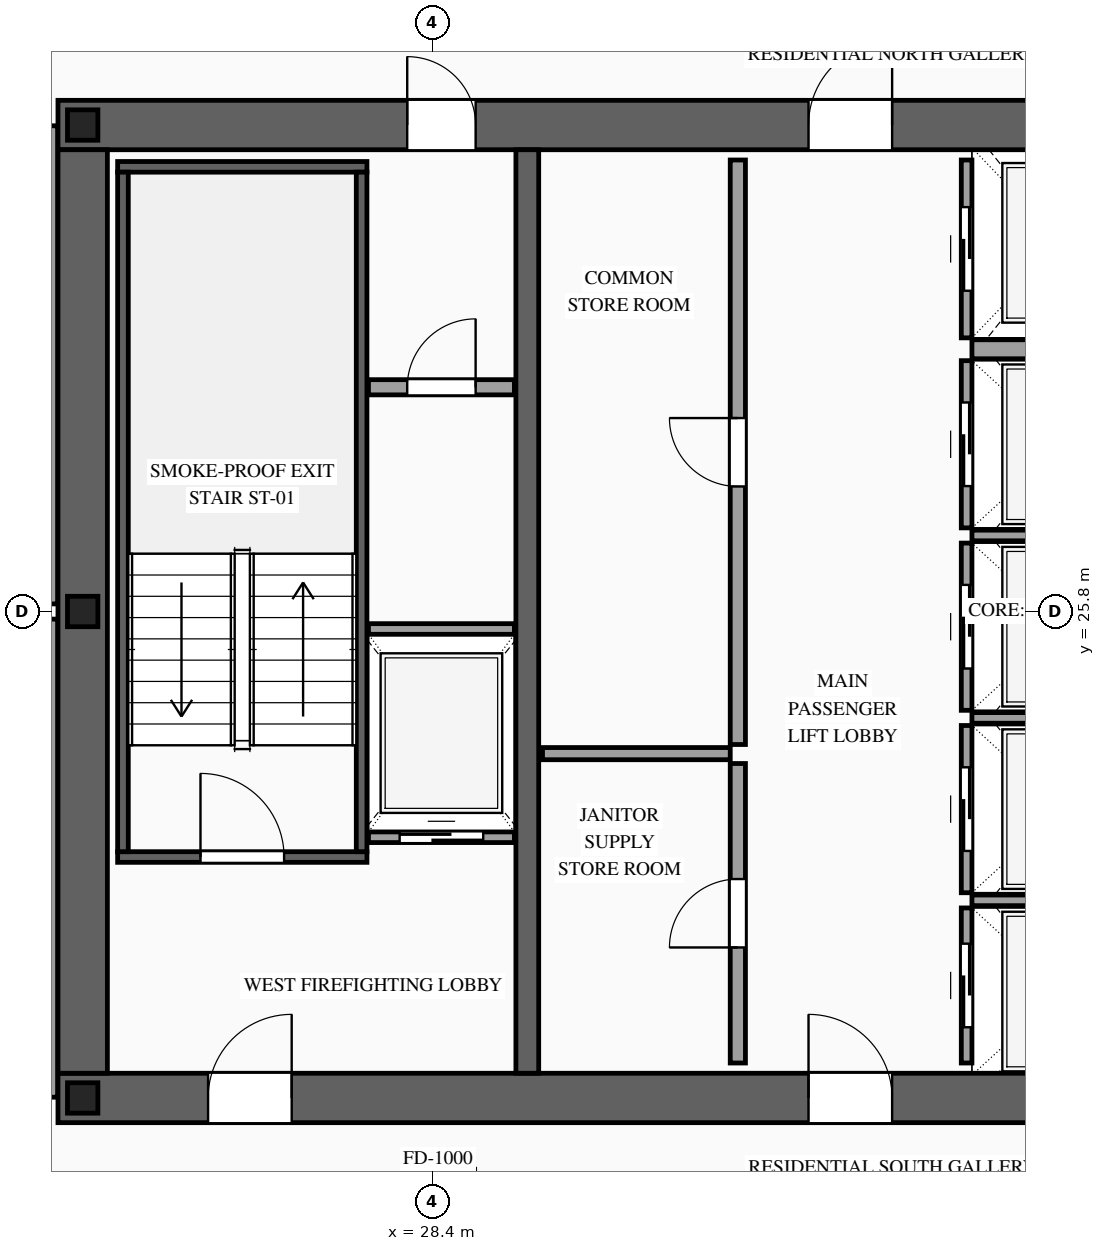
"""IFC4 building model, lengths in metres.
Left out: names, types, materials, properties, quantities, classifications, styles, units other than length and angle.
Written with IfcOpenShell. Run it as: python <this file> out.ifc"""

import sys

from ifc_helpers import new_model, si_unit, direction, frame, frame_2d, origin, origin_2d, place, context, subcontext, project, spatial, rectangle, i_section, extrude, source, transform, mapped, element, fill, save


model = new_model("IFC4")
c1 = context("Model", 3, precision=1e-05, world=origin(), true_north=direction((0.0, 1.0)))
c2 = subcontext(c1, "Body", "Model", "MODEL_VIEW")
j1 = project(units=[si_unit("LENGTHUNIT", "METRE"), si_unit("PLANEANGLEUNIT", "RADIAN")], contexts=[c1])
p1 = place(None, origin())
s1 = spatial("IfcSite", under=j1, at=p1, CompositionType="ELEMENT")
p2 = place(p1, origin())
s2 = spatial("IfcBuilding", under=s1, at=p2, CompositionType="ELEMENT")
p3 = place(p2, frame((0.0, 0.0, 212.5)))
s3 = spatial("IfcBuildingStorey", under=s2, at=p3, CompositionType="ELEMENT", Elevation=212.5)
p4 = place(p3, frame((23.475, 19.4, 0.0), z_axis=(0.0, 0.0, 1.0), x_axis=(1.0, 0.0, 0.0)))
e1 = element("IfcWall", 1, at=p4, inside=s3, PredefinedType="SHEAR", context=c2, shape_type="SweptSolid", body=[
    extrude(rectangle(XDim=27.05, YDim=0.65, at=frame_2d((13.525, 0.0))), origin(), (0.0, 0.0, 1.0), 3.5),
])
p5 = place(p4, frame((1.975, 0.0, 0.0)))
e2 = element("IfcOpeningElement", 2, at=p5, cuts=e1, PredefinedType="OPENING", context=c2, shape_type="SweptSolid", body=[
    extrude(rectangle(XDim=1.1, YDim=2.2, at=frame_2d((0.55, 1.1))), frame((0.0, 0.34, 0.0), z_axis=(0.0, -1.0, 0.0), x_axis=(1.0, 0.0, 0.0)), (0.0, 0.0, 1.0), 0.68),
])
p6 = place(p4, frame((9.875, 0.0, 0.0)))
e3 = element("IfcOpeningElement", 3, at=p6, cuts=e1, PredefinedType="OPENING", context=c2, shape_type="SweptSolid", body=[
    extrude(rectangle(XDim=1.1, YDim=2.2, at=frame_2d((0.55, 1.1))), frame((0.0, 0.34, 0.0), z_axis=(0.0, -1.0, 0.0), x_axis=(1.0, 0.0, 0.0)), (0.0, 0.0, 1.0), 0.68),
])
p7 = place(p4, frame((23.075, 0.0, 0.0)))
e4 = element("IfcOpeningElement", 4, at=p7, cuts=e1, PredefinedType="OPENING", context=c2, shape_type="SweptSolid", body=[
    extrude(rectangle(XDim=1.1, YDim=2.2, at=frame_2d((0.55, 1.1))), frame((0.0, 0.34, 0.0), z_axis=(0.0, -1.0, 0.0), x_axis=(1.0, 0.0, 0.0)), (0.0, 0.0, 1.0), 0.68),
])
p8 = place(p4, frame((19.695, 0.0, 0.0)))
e5 = element("IfcOpeningElement", 5, at=p8, cuts=e1, PredefinedType="OPENING", context=c2, shape_type="SweptSolid", body=[
    extrude(rectangle(XDim=0.9, YDim=2.15, at=frame_2d((0.45, 1.075))), frame((0.0, 0.34, 0.0), z_axis=(0.0, -1.0, 0.0), x_axis=(1.0, 0.0, 0.0)), (0.0, 0.0, 1.0), 0.68),
])
p9 = place(p4, frame((18.255, 0.0, 0.0)))
e6 = element("IfcOpeningElement", 6, at=p9, cuts=e1, PredefinedType="OPENING", context=c2, shape_type="SweptSolid", body=[
    extrude(rectangle(XDim=0.9, YDim=2.15, at=frame_2d((0.45, 1.075))), frame((0.0, 0.34, 0.0), z_axis=(0.0, -1.0, 0.0), x_axis=(1.0, 0.0, 0.0)), (0.0, 0.0, 1.0), 0.68),
])
p10 = place(p3, frame((23.475, 32.2, 0.0), z_axis=(0.0, 0.0, 1.0), x_axis=(1.0, 0.0, 0.0)))
e7 = element("IfcWall", 7, at=p10, inside=s3, PredefinedType="SHEAR", context=c2, shape_type="SweptSolid", body=[
    extrude(rectangle(XDim=27.05, YDim=0.65, at=frame_2d((13.525, 0.0))), origin(), (0.0, 0.0, 1.0), 3.5),
])
p11 = place(p10, frame((4.595, 0.0, 0.0)))
e8 = element("IfcOpeningElement", 8, at=p11, cuts=e7, PredefinedType="OPENING", context=c2, shape_type="SweptSolid", body=[
    extrude(rectangle(XDim=0.9, YDim=2.15, at=frame_2d((0.45, 1.075))), frame((0.0, 0.34, 0.0), z_axis=(0.0, -1.0, 0.0), x_axis=(1.0, 0.0, 0.0)), (0.0, 0.0, 1.0), 0.68),
])
p12 = place(p10, frame((9.875, 0.0, 0.0)))
e9 = element("IfcOpeningElement", 9, at=p12, cuts=e7, PredefinedType="OPENING", context=c2, shape_type="SweptSolid", body=[
    extrude(rectangle(XDim=1.1, YDim=2.2, at=frame_2d((0.55, 1.1))), frame((0.0, 0.34, 0.0), z_axis=(0.0, -1.0, 0.0), x_axis=(1.0, 0.0, 0.0)), (0.0, 0.0, 1.0), 0.68),
])
p13 = place(p10, frame((15.725, 0.0, 0.0)))
e10 = element("IfcOpeningElement", 10, at=p13, cuts=e7, PredefinedType="OPENING", context=c2, shape_type="SweptSolid", body=[
    extrude(rectangle(XDim=1.1, YDim=2.2, at=frame_2d((0.55, 1.1))), frame((0.0, 0.34, 0.0), z_axis=(0.0, -1.0, 0.0), x_axis=(1.0, 0.0, 0.0)), (0.0, 0.0, 1.0), 0.68),
])
p14 = place(p10, frame((18.925, 0.0, 0.0)))
e11 = element("IfcOpeningElement", 11, at=p14, cuts=e7, PredefinedType="OPENING", context=c2, shape_type="SweptSolid", body=[
    extrude(rectangle(XDim=0.9, YDim=2.15, at=frame_2d((0.45, 1.075))), frame((0.0, 0.34, 0.0), z_axis=(0.0, -1.0, 0.0), x_axis=(1.0, 0.0, 0.0)), (0.0, 0.0, 1.0), 0.68),
])
m1 = source(origin(), c2, "Body", "SweptSolid", [
    extrude(rectangle(XDim=12.15, YDim=0.65, at=frame_2d((6.075, 0.0))), origin(), (0.0, 0.0, 1.0), 3.5),
])
p15 = place(p3, frame((23.8, 19.725, 0.0), z_axis=(0.0, 0.0, 1.0), x_axis=(0.0, 1.0, 0.0)))
e12 = element("IfcWall", 12, at=p15, inside=s3, PredefinedType="SHEAR", context=c2, shape_type="MappedRepresentation", body=[
    mapped(m1, transform((0.0, 0.0, 0.0), scale=1.0)),
])
m2 = source(origin(), c2, "Body", "SweptSolid", [
    extrude(rectangle(XDim=12.15, YDim=0.3, at=frame_2d((6.075, 0.0))), origin(), (0.0, 0.0, 1.0), 3.5),
])
p16 = place(p3, frame((29.65, 19.725, 0.0), z_axis=(0.0, 0.0, 1.0), x_axis=(0.0, 1.0, 0.0)))
e13 = element("IfcWall", 13, at=p16, inside=s3, PredefinedType="SOLIDWALL", context=c2, shape_type="MappedRepresentation", body=[
    mapped(m2, transform((0.0, 0.0, 0.0), scale=1.0)),
])
m3 = source(origin(), c2, "Body", "SweptSolid", [
    extrude(i_section(OverallWidth=0.4, OverallDepth=0.4, WebThickness=0.013, FlangeThickness=0.021, at=origin_2d()), origin(), (0.0, 0.0, 1.0), 3.5),
])
for number, where, z_axis, x_axis in (
    (14, (23.8, 19.4, 0.0), (0.0, 0.0, 1.0), (1.0, 0.0, 0.0)),
    (15, (23.8, 25.8, 0.0), (0.0, 0.0, 1.0), (1.0, 0.0, 0.0)),
    (16, (23.8, 32.2, 0.0), (0.0, 0.0, 1.0), (1.0, 0.0, 0.0)),
):
    element("IfcColumn", number, at=place(p3, frame(where, z_axis=z_axis, x_axis=x_axis)), inside=s3, PredefinedType="COLUMN", context=c2, shape_type="MappedRepresentation", body=[
        mapped(m3, transform((0.0, 0.0, 0.0), scale=1.0)),
    ])
p17 = place(p3, frame((27.56, 22.83, 0.0), z_axis=(0.0, 0.0, 1.0), x_axis=(1.0, 0.0, 0.0)))
e17 = element("IfcWall", 17, at=p17, inside=s3, PredefinedType="SOLIDWALL", context=c2, shape_type="SweptSolid", body=[
    extrude(rectangle(XDim=1.92, YDim=0.14, at=frame_2d((0.96, 0.0))), origin(), (0.0, 0.0, 1.0), 3.28),
])
p18 = place(p17, frame((0.41, 0.0, 0.0)))
e18 = element("IfcOpeningElement", 18, at=p18, cuts=e17, PredefinedType="OPENING", context=c2, shape_type="SweptSolid", body=[
    extrude(rectangle(XDim=1.1, YDim=2.2, at=frame_2d((0.55, 1.1))), frame((0.0, 0.085, 0.0), z_axis=(0.0, -1.0, 0.0), x_axis=(1.0, 0.0, 0.0)), (0.0, 0.0, 1.0), 0.17),
])
m4 = source(origin(), c2, "Body", "SweptSolid", [
    extrude(rectangle(XDim=1.92, YDim=0.14, at=frame_2d((0.96, 0.0))), origin(), (0.0, 0.0, 1.0), 3.28),
])
p19 = place(p3, frame((27.56, 25.57, 0.0), z_axis=(0.0, 0.0, 1.0), x_axis=(1.0, 0.0, 0.0)))
e19 = element("IfcWall", 19, at=p19, inside=s3, PredefinedType="SOLIDWALL", context=c2, shape_type="MappedRepresentation", body=[
    mapped(m4, transform((0.0, 0.0, 0.0), scale=1.0)),
])
p20 = place(p3, frame((35.43, 19.86, 0.0), z_axis=(0.0, 0.0, 1.0), x_axis=(0.0, 1.0, 0.0)))
e20 = element("IfcWall", 20, at=p20, inside=s3, PredefinedType="SOLIDWALL", context=c2, shape_type="SweptSolid", body=[
    extrude(rectangle(XDim=2.04, YDim=0.14, at=frame_2d((1.02, 0.0))), origin(), (0.0, 0.0, 1.0), 3.28),
])
p21 = place(p20, frame((0.47, 0.0, 0.0)))
e21 = element("IfcOpeningElement", 21, at=p21, cuts=e20, PredefinedType="OPENING", context=c2, shape_type="SweptSolid", body=[
    extrude(rectangle(XDim=1.1, YDim=2.2, at=frame_2d((0.55, 1.1))), frame((0.0, 0.085, 0.0), z_axis=(0.0, -1.0, 0.0), x_axis=(1.0, 0.0, 0.0)), (0.0, 0.0, 1.0), 0.17),
])
m5 = source(origin(), c2, "Body", "SweptSolid", [
    extrude(rectangle(XDim=2.4, YDim=0.14, at=frame_2d((1.2, 0.0))), origin(), (0.0, 0.0, 1.0), 3.28),
])
p22 = place(p3, frame((35.5, 22.0, 0.0), z_axis=(0.0, 0.0, 1.0), x_axis=(1.0, 0.0, 0.0)))
e22 = element("IfcWall", 22, at=p22, inside=s3, PredefinedType="SOLIDWALL", context=c2, shape_type="MappedRepresentation", body=[
    mapped(m5, transform((0.0, 0.0, 0.0), scale=1.0)),
])
p23 = place(p3, frame((35.43, 22.1, 0.0), z_axis=(0.0, 0.0, 1.0), x_axis=(0.0, 1.0, 0.0)))
e23 = element("IfcWall", 23, at=p23, inside=s3, PredefinedType="SOLIDWALL", context=c2, shape_type="SweptSolid", body=[
    extrude(rectangle(XDim=2.2, YDim=0.14, at=frame_2d((1.1, 0.0))), origin(), (0.0, 0.0, 1.0), 3.28),
])
p24 = place(p23, frame((0.55, 0.0, 0.0)))
e24 = element("IfcOpeningElement", 24, at=p24, cuts=e23, PredefinedType="OPENING", context=c2, shape_type="SweptSolid", body=[
    extrude(rectangle(XDim=1.1, YDim=2.2, at=frame_2d((0.55, 1.1))), frame((0.0, 0.085, 0.0), z_axis=(0.0, -1.0, 0.0), x_axis=(1.0, 0.0, 0.0)), (0.0, 0.0, 1.0), 0.17),
])
p25 = place(p3, frame((35.5, 24.4, 0.0), z_axis=(0.0, 0.0, 1.0), x_axis=(1.0, 0.0, 0.0)))
e25 = element("IfcWall", 25, at=p25, inside=s3, PredefinedType="SOLIDWALL", context=c2, shape_type="MappedRepresentation", body=[
    mapped(m5, transform((0.0, 0.0, 0.0), scale=1.0)),
])
p26 = place(p3, frame((35.43, 24.5, 0.0), z_axis=(0.0, 0.0, 1.0), x_axis=(0.0, 1.0, 0.0)))
e26 = element("IfcWall", 26, at=p26, inside=s3, PredefinedType="SOLIDWALL", context=c2, shape_type="SweptSolid", body=[
    extrude(rectangle(XDim=2.2, YDim=0.14, at=frame_2d((1.1, 0.0))), origin(), (0.0, 0.0, 1.0), 3.28),
])
p27 = place(p26, frame((0.55, 0.0, 0.0)))
e27 = element("IfcOpeningElement", 27, at=p27, cuts=e26, PredefinedType="OPENING", context=c2, shape_type="SweptSolid", body=[
    extrude(rectangle(XDim=1.1, YDim=2.2, at=frame_2d((0.55, 1.1))), frame((0.0, 0.085, 0.0), z_axis=(0.0, -1.0, 0.0), x_axis=(1.0, 0.0, 0.0)), (0.0, 0.0, 1.0), 0.17),
])
p28 = place(p3, frame((35.5, 26.8, 0.0), z_axis=(0.0, 0.0, 1.0), x_axis=(1.0, 0.0, 0.0)))
e28 = element("IfcWall", 28, at=p28, inside=s3, PredefinedType="SOLIDWALL", context=c2, shape_type="MappedRepresentation", body=[
    mapped(m5, transform((0.0, 0.0, 0.0), scale=1.0)),
])
p29 = place(p3, frame((35.43, 26.9, 0.0), z_axis=(0.0, 0.0, 1.0), x_axis=(0.0, 1.0, 0.0)))
e29 = element("IfcWall", 29, at=p29, inside=s3, PredefinedType="SOLIDWALL", context=c2, shape_type="SweptSolid", body=[
    extrude(rectangle(XDim=2.2, YDim=0.14, at=frame_2d((1.1, 0.0))), origin(), (0.0, 0.0, 1.0), 3.28),
])
p30 = place(p29, frame((0.55, 0.0, 0.0)))
e30 = element("IfcOpeningElement", 30, at=p30, cuts=e29, PredefinedType="OPENING", context=c2, shape_type="SweptSolid", body=[
    extrude(rectangle(XDim=1.1, YDim=2.2, at=frame_2d((0.55, 1.1))), frame((0.0, 0.085, 0.0), z_axis=(0.0, -1.0, 0.0), x_axis=(1.0, 0.0, 0.0)), (0.0, 0.0, 1.0), 0.17),
])
p31 = place(p3, frame((35.43, 29.4, 0.0), z_axis=(0.0, 0.0, 1.0), x_axis=(0.0, 1.0, 0.0)))
e31 = element("IfcWall", 31, at=p31, inside=s3, PredefinedType="SOLIDWALL", context=c2, shape_type="SweptSolid", body=[
    extrude(rectangle(XDim=2.34, YDim=0.14, at=frame_2d((1.17, 0.0))), origin(), (0.0, 0.0, 1.0), 3.28),
])
p32 = place(p31, frame((0.62, 0.0, 0.0)))
e32 = element("IfcOpeningElement", 32, at=p32, cuts=e31, PredefinedType="OPENING", context=c2, shape_type="SweptSolid", body=[
    extrude(rectangle(XDim=1.1, YDim=2.2, at=frame_2d((0.55, 1.1))), frame((0.0, 0.085, 0.0), z_axis=(0.0, -1.0, 0.0), x_axis=(1.0, 0.0, 0.0)), (0.0, 0.0, 1.0), 0.17),
])
m6 = source(origin(), c2, "Body", "SweptSolid", [
    extrude(rectangle(XDim=2.4, YDim=0.25, at=frame_2d((1.2, 0.0))), origin(), (0.0, 0.0, 1.0), 3.28),
])
p33 = place(p3, frame((35.5, 29.25, 0.0), z_axis=(0.0, 0.0, 1.0), x_axis=(1.0, 0.0, 0.0)))
e33 = element("IfcWall", 33, at=p33, inside=s3, PredefinedType="SOLIDWALL", context=c2, shape_type="MappedRepresentation", body=[
    mapped(m6, transform((0.0, 0.0, 0.0), scale=1.0)),
])
p34 = place(p3, frame((24.26, 22.57, 0.0), z_axis=(0.0, 0.0, 1.0), x_axis=(1.0, 0.0, 0.0)))
e34 = element("IfcWall", 34, at=p34, inside=s3, PredefinedType="SOLIDWALL", context=c2, shape_type="SweptSolid", body=[
    extrude(rectangle(XDim=3.28, YDim=0.14, at=frame_2d((1.64, 0.0))), origin(), (0.0, 0.0, 1.0), 3.28),
])
p35 = place(p34, frame((1.09, 0.0, 0.0)))
e35 = element("IfcOpeningElement", 35, at=p35, cuts=e34, PredefinedType="OPENING", context=c2, shape_type="SweptSolid", body=[
    extrude(rectangle(XDim=1.1, YDim=2.2, at=frame_2d((0.55, 1.1))), frame((0.0, 0.085, 0.0), z_axis=(0.0, -1.0, 0.0), x_axis=(1.0, 0.0, 0.0)), (0.0, 0.0, 1.0), 0.17),
])
m7 = source(origin(), c2, "Body", "SweptSolid", [
    extrude(rectangle(XDim=3.28, YDim=0.14, at=frame_2d((1.64, 0.0))), origin(), (0.0, 0.0, 1.0), 3.28),
])
p36 = place(p3, frame((24.26, 31.65, 0.0), z_axis=(0.0, 0.0, 1.0), x_axis=(1.0, 0.0, 0.0)))
e36 = element("IfcWall", 36, at=p36, inside=s3, PredefinedType="SOLIDWALL", context=c2, shape_type="MappedRepresentation", body=[
    mapped(m7, transform((0.0, 0.0, 0.0), scale=1.0)),
])
m8 = source(origin(), c2, "Body", "SweptSolid", [
    extrude(rectangle(XDim=8.94, YDim=0.14, at=frame_2d((4.47, 0.0))), origin(), (0.0, 0.0, 1.0), 3.28),
])
for number, where, z_axis, x_axis in (
    (37, (24.33, 22.64, 0.0), (0.0, 0.0, 1.0), (0.0, 1.0, 0.0)),
    (38, (27.47, 22.64, 0.0), (0.0, 0.0, 1.0), (0.0, 1.0, 0.0)),
):
    element("IfcWall", number, at=place(p3, frame(where, z_axis=z_axis, x_axis=x_axis)), inside=s3, PredefinedType="SOLIDWALL", context=c2, shape_type="MappedRepresentation", body=[
        mapped(m8, transform((0.0, 0.0, 0.0), scale=1.0)),
    ])
p37 = place(p3, frame((27.56, 28.75, 0.0), z_axis=(0.0, 0.0, 1.0), x_axis=(1.0, 0.0, 0.0)))
e39 = element("IfcWall", 39, at=p37, inside=s3, PredefinedType="PARTITIONING", context=c2, shape_type="SweptSolid", body=[
    extrude(rectangle(XDim=1.92, YDim=0.2, at=frame_2d((0.96, 0.0))), origin(), (0.0, 0.0, 1.0), 3.28),
])
p38 = place(p37, frame((0.51, 0.0, 0.0)))
e40 = element("IfcOpeningElement", 40, at=p38, cuts=e39, PredefinedType="OPENING", context=c2, shape_type="SweptSolid", body=[
    extrude(rectangle(XDim=0.9, YDim=2.15, at=frame_2d((0.45, 1.075))), frame((0.0, 0.115, 0.0), z_axis=(0.0, -1.0, 0.0), x_axis=(1.0, 0.0, 0.0)), (0.0, 0.0, 1.0), 0.23),
])
p39 = place(p3, frame((32.42, 19.86, 0.0), z_axis=(0.0, 0.0, 1.0), x_axis=(0.0, 1.0, 0.0)))
e41 = element("IfcWall", 41, at=p39, inside=s3, PredefinedType="PARTITIONING", context=c2, shape_type="SweptSolid", body=[
    extrude(rectangle(XDim=3.94, YDim=0.2, at=frame_2d((1.97, 0.0))), origin(), (0.0, 0.0, 1.0), 3.28),
])
p40 = place(p39, frame((1.52, 0.0, 0.0)))
e42 = element("IfcOpeningElement", 42, at=p40, cuts=e41, PredefinedType="OPENING", context=c2, shape_type="SweptSolid", body=[
    extrude(rectangle(XDim=0.9, YDim=2.15, at=frame_2d((0.45, 1.075))), frame((0.0, 0.115, 0.0), z_axis=(0.0, -1.0, 0.0), x_axis=(1.0, 0.0, 0.0)), (0.0, 0.0, 1.0), 0.23),
])
p41 = place(p3, frame((32.42, 24.05, 0.0), z_axis=(0.0, 0.0, 1.0), x_axis=(0.0, 1.0, 0.0)))
e43 = element("IfcWall", 43, at=p41, inside=s3, PredefinedType="PARTITIONING", context=c2, shape_type="SweptSolid", body=[
    extrude(rectangle(XDim=7.69, YDim=0.2, at=frame_2d((3.845, 0.0))), origin(), (0.0, 0.0, 1.0), 3.28),
])
p42 = place(p41, frame((3.395, 0.0, 0.0)))
e44 = element("IfcOpeningElement", 44, at=p42, cuts=e43, PredefinedType="OPENING", context=c2, shape_type="SweptSolid", body=[
    extrude(rectangle(XDim=0.9, YDim=2.15, at=frame_2d((0.45, 1.075))), frame((0.0, 0.115, 0.0), z_axis=(0.0, -1.0, 0.0), x_axis=(1.0, 0.0, 0.0)), (0.0, 0.0, 1.0), 0.23),
])
m9 = source(origin(), c2, "Body", "SweptSolid", [
    extrude(rectangle(XDim=2.47, YDim=0.16, at=frame_2d((1.235, 0.0))), origin(), (0.0, 0.0, 1.0), 3.28),
])
p43 = place(p3, frame((29.85, 23.93, 0.0), z_axis=(0.0, 0.0, 1.0), x_axis=(1.0, 0.0, 0.0)))
e45 = element("IfcWall", 45, at=p43, inside=s3, PredefinedType="PARTITIONING", context=c2, shape_type="MappedRepresentation", body=[
    mapped(m9, transform((0.0, 0.0, 0.0), scale=1.0)),
])
m10 = source(origin(), c2, "Body", "SweptSolid", [
    extrude(rectangle(XDim=6.29, YDim=0.2, at=frame_2d((3.145, 0.0))), origin(), (0.0, 0.0, 1.0), 3.28),
])
for number, where, z_axis, x_axis in (
    (46, (23.37, 19.41, 0.0), (0.0, 0.0, 1.0), (0.0, 1.0, 0.0)),
    (47, (23.37, 25.9, 0.0), (0.0, 0.0, 1.0), (0.0, 1.0, 0.0)),
):
    element("IfcWall", number, at=place(p3, frame(where, z_axis=z_axis, x_axis=x_axis)), inside=s3, PredefinedType="PARTITIONING", context=c2, shape_type="MappedRepresentation", body=[
        mapped(m10, transform((0.0, 0.0, 0.0), scale=1.0)),
    ])
m11 = source(origin(), c2, "Body", "SweptSolid", [
    extrude(rectangle(XDim=1.1, YDim=2.2, at=frame_2d((0.55, 1.1))), frame((0.0, 0.025, 0.0), z_axis=(0.0, -1.0, 0.0), x_axis=(1.0, 0.0, 0.0)), (0.0, 0.0, 1.0), 0.05),
])
p44 = place(p18, origin())
e48 = element("IfcDoor", 48, at=p44, inside=s3, OperationType="SLIDING_TO_LEFT", PredefinedType="DOOR", context=c2, shape_type="MappedRepresentation", body=[
    mapped(m11, transform((0.0, 0.0, 0.0), scale=1.0)),
])
fill(e18, e48)
p45 = place(p21, origin())
e49 = element("IfcDoor", 49, at=p45, inside=s3, OperationType="SLIDING_TO_RIGHT", PredefinedType="DOOR", context=c2, shape_type="MappedRepresentation", body=[
    mapped(m11, transform((0.0, 0.0, 0.0), scale=1.0)),
])
fill(e21, e49)
p46 = place(p24, origin())
e50 = element("IfcDoor", 50, at=p46, inside=s3, OperationType="SLIDING_TO_LEFT", PredefinedType="DOOR", context=c2, shape_type="MappedRepresentation", body=[
    mapped(m11, transform((0.0, 0.0, 0.0), scale=1.0)),
])
fill(e24, e50)
p47 = place(p27, origin())
e51 = element("IfcDoor", 51, at=p47, inside=s3, OperationType="SLIDING_TO_RIGHT", PredefinedType="DOOR", context=c2, shape_type="MappedRepresentation", body=[
    mapped(m11, transform((0.0, 0.0, 0.0), scale=1.0)),
])
fill(e27, e51)
p48 = place(p30, origin())
e52 = element("IfcDoor", 52, at=p48, inside=s3, OperationType="SLIDING_TO_LEFT", PredefinedType="DOOR", context=c2, shape_type="MappedRepresentation", body=[
    mapped(m11, transform((0.0, 0.0, 0.0), scale=1.0)),
])
fill(e30, e52)
p49 = place(p32, origin())
e53 = element("IfcDoor", 53, at=p49, inside=s3, OperationType="SLIDING_TO_RIGHT", PredefinedType="DOOR", context=c2, shape_type="MappedRepresentation", body=[
    mapped(m11, transform((0.0, 0.0, 0.0), scale=1.0)),
])
fill(e32, e53)
m12 = source(origin(), c2, "Body", "SweptSolid", [
    extrude(rectangle(XDim=1.1, YDim=2.2, at=frame_2d((0.55, 1.1))), frame((0.0, 0.025, 0.0), z_axis=(0.0, -1.0, 0.0), x_axis=(1.0, 0.0, 0.0)), (0.0, 0.0, 1.0), 0.05),
])
p50 = place(p35, origin())
e54 = element("IfcDoor", 54, at=p50, inside=s3, OperationType="SINGLE_SWING_LEFT", PredefinedType="DOOR", context=c2, shape_type="MappedRepresentation", body=[
    mapped(m12, transform((0.0, 0.0, 0.0), scale=1.0)),
])
fill(e35, e54)
p51 = place(p5, origin())
e55 = element("IfcDoor", 55, at=p51, inside=s3, OperationType="SINGLE_SWING_RIGHT", PredefinedType="DOOR", context=c2, shape_type="MappedRepresentation", body=[
    mapped(m12, transform((0.0, 0.0, 0.0), scale=1.0)),
])
fill(e2, e55)
p52 = place(p6, origin())
e56 = element("IfcDoor", 56, at=p52, inside=s3, OperationType="SINGLE_SWING_LEFT", PredefinedType="DOOR", context=c2, shape_type="MappedRepresentation", body=[
    mapped(m12, transform((0.0, 0.0, 0.0), scale=1.0)),
])
fill(e3, e56)
m13 = source(origin(), c2, "Body", "SweptSolid", [
    extrude(rectangle(XDim=0.9, YDim=2.15, at=frame_2d((0.45, 1.075))), frame((0.0, 0.025, 0.0), z_axis=(0.0, -1.0, 0.0), x_axis=(1.0, 0.0, 0.0)), (0.0, 0.0, 1.0), 0.05),
])
p53 = place(p11, origin())
e57 = element("IfcDoor", 57, at=p53, inside=s3, OperationType="SINGLE_SWING_LEFT", PredefinedType="DOOR", context=c2, shape_type="MappedRepresentation", body=[
    mapped(m13, transform((0.0, 0.0, 0.0), scale=1.0)),
])
fill(e8, e57)
p54 = place(p12, origin())
e58 = element("IfcDoor", 58, at=p54, inside=s3, OperationType="SINGLE_SWING_RIGHT", PredefinedType="DOOR", context=c2, shape_type="MappedRepresentation", body=[
    mapped(m12, transform((0.0, 0.0, 0.0), scale=1.0)),
])
fill(e9, e58)
p55 = place(p38, origin())
e59 = element("IfcDoor", 59, at=p55, inside=s3, OperationType="SINGLE_SWING_RIGHT", PredefinedType="DOOR", context=c2, shape_type="MappedRepresentation", body=[
    mapped(m13, transform((0.0, 0.0, 0.0), scale=1.0)),
])
fill(e40, e59)
p56 = place(p40, origin())
e60 = element("IfcDoor", 60, at=p56, inside=s3, OperationType="SINGLE_SWING_LEFT", PredefinedType="DOOR", context=c2, shape_type="MappedRepresentation", body=[
    mapped(m13, transform((0.0, 0.0, 0.0), scale=1.0)),
])
fill(e42, e60)
p57 = place(p42, origin())
e61 = element("IfcDoor", 61, at=p57, inside=s3, OperationType="SINGLE_SWING_RIGHT", PredefinedType="DOOR", context=c2, shape_type="MappedRepresentation", body=[
    mapped(m13, transform((0.0, 0.0, 0.0), scale=1.0)),
])
fill(e44, e61)
save(model, sys.argv[1])
